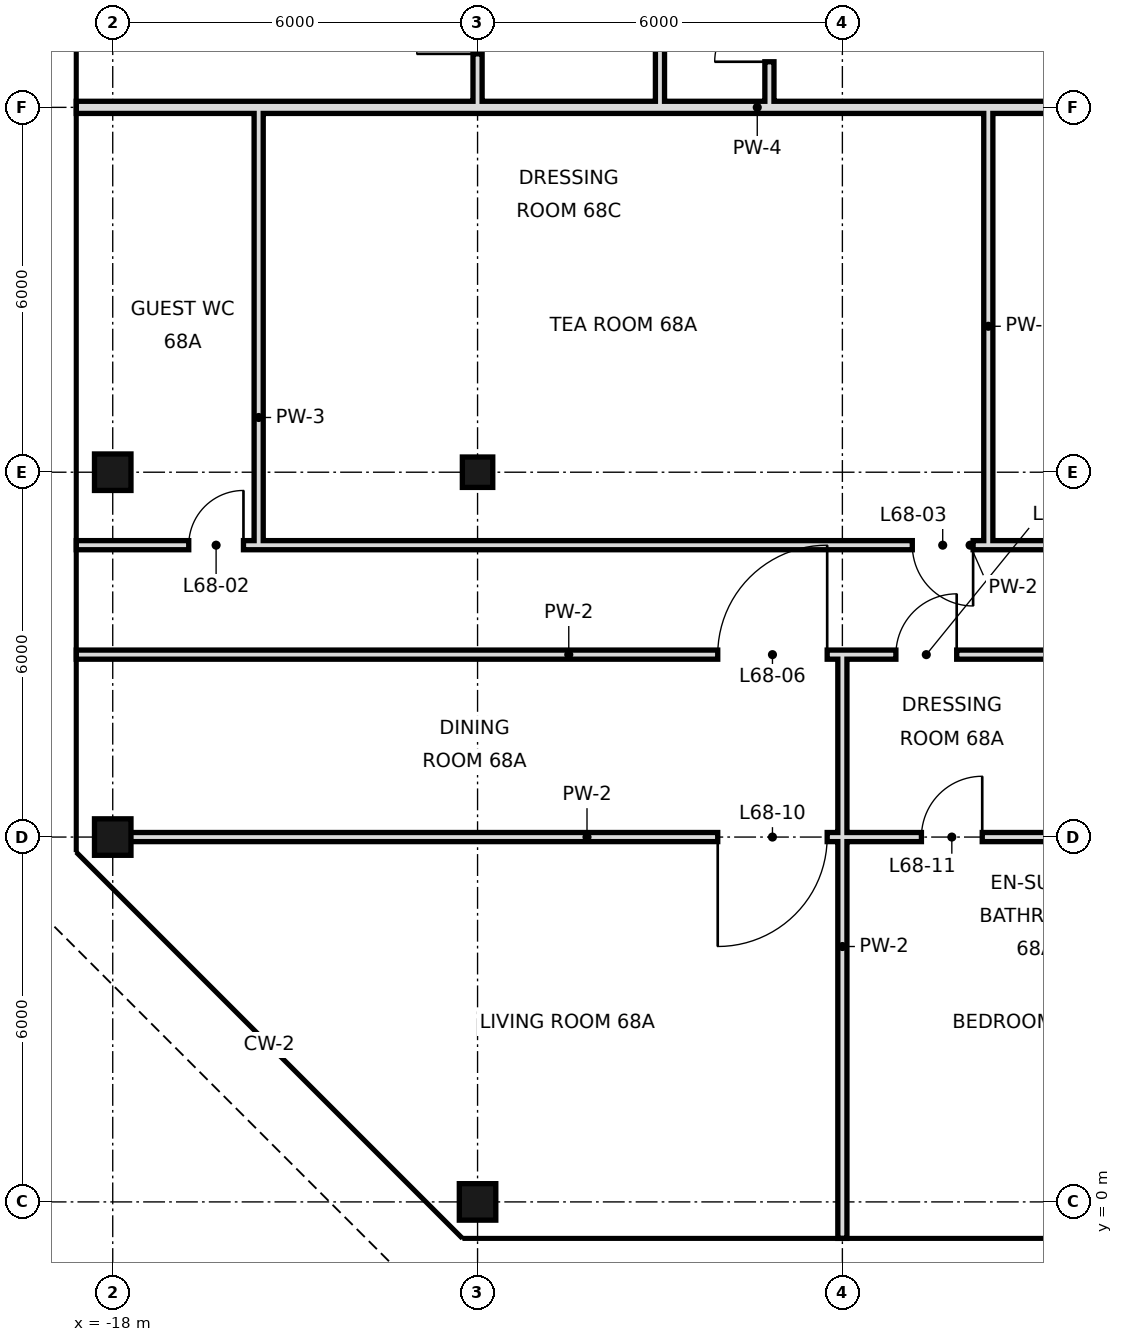
"""IFC4 building model, lengths in metres.
Left out: names, types, materials, properties, quantities, classifications, styles, units other than length and angle.
Written with IfcOpenShell. Run it as: python <this file> out.ifc"""

import sys

from ifc_helpers import new_model, si_unit, direction, frame, frame_2d, origin, origin_2d, place, context, subcontext, project, spatial, rectangle, hollow_rectangle, extrude, element, fill, save


model = new_model("IFC4")
c1 = context("Model", 3, precision=1e-05, world=origin(), true_north=direction((0.0, 1.0)))
c2 = subcontext(c1, "Body", "Model", "MODEL_VIEW")
j1 = project(units=[si_unit("LENGTHUNIT", "METRE"), si_unit("PLANEANGLEUNIT", "RADIAN")], contexts=[c1])
p1 = place(None, origin())
s1 = spatial("IfcSite", under=j1, at=p1, CompositionType="ELEMENT")
p2 = place(p1, origin())
s2 = spatial("IfcBuilding", under=s1, at=p2, CompositionType="ELEMENT")
p3 = place(p2, frame((0.0, 0.0, 290.8)))
s3 = spatial("IfcBuildingStorey", under=s2, at=p3, CompositionType="ELEMENT", Elevation=290.8)
for number, where, z_axis, x_axis in (
    (1, (-18.0, 6.0, -0.3), (0.0, 0.0, 1.0), (1.0, 0.0, 0.0)),
    (2, (-18.0, 12.0, -0.3), (0.0, 0.0, 1.0), (1.0, 0.0, 0.0)),
    (3, (-12.0, 0.0, -0.3), (0.0, 0.0, 1.0), (1.0, 0.0, 0.0)),
):
    element("IfcColumn", number, at=place(p3, frame(where, z_axis=z_axis, x_axis=x_axis)), inside=s3, PredefinedType="COLUMN", context=c2, shape_type="SweptSolid", body=[
        extrude(hollow_rectangle(XDim=0.6, YDim=0.6, WallThickness=0.028, at=origin_2d()), origin(), (0.0, 0.0, 1.0), 3.9),
    ])
p4 = place(p3, frame((-12.0, 12.0, 0.0), z_axis=(0.0, 0.0, 1.0), x_axis=(1.0, 0.0, 0.0)))
e4 = element("IfcColumn", 4, at=p4, inside=s3, PredefinedType="COLUMN", context=c2, shape_type="SweptSolid", body=[
    extrude(hollow_rectangle(XDim=0.5, YDim=0.5, WallThickness=0.025, at=origin_2d()), origin(), (0.0, 0.0, 1.0), 3.6),
])
p5 = place(p3, frame((-12.0, 18.0, 0.0), z_axis=(0.0, 0.0, 1.0), x_axis=(0.0, 1.0, 0.0)))
e5 = element("IfcWall", 5, at=p5, inside=s3, PredefinedType="PARTITIONING", context=c2, shape_type="SweptSolid", body=[
    extrude(rectangle(XDim=3.6, YDim=0.15, at=frame_2d((1.8, 0.0))), origin(), (0.0, 0.0, 1.0), 2.72),
])
p6 = place(p5, frame((0.88, 0.0, 0.0)))
e6 = element("IfcOpeningElement", 6, at=p6, cuts=e5, PredefinedType="OPENING", context=c2, shape_type="SweptSolid", body=[
    extrude(rectangle(XDim=1.0, YDim=2.4, at=frame_2d((0.5, 1.2))), frame((0.0, 0.085, 0.0), z_axis=(0.0, -1.0, 0.0), x_axis=(1.0, 0.0, 0.0)), (0.0, 0.0, 1.0), 0.17),
])
for number, where, z_axis, x_axis in (
    (7, (-15.6, 10.8, 0.0), (0.0, 0.0, 1.0), (0.0, 1.0, 0.0)),
    (8, (-3.6, 10.8, 0.0), (0.0, 0.0, 1.0), (0.0, 1.0, 0.0)),
):
    element("IfcWall", number, at=place(p3, frame(where, z_axis=z_axis, x_axis=x_axis)), inside=s3, PredefinedType="PARTITIONING", context=c2, shape_type="SweptSolid", body=[
        extrude(rectangle(XDim=7.2, YDim=0.15, at=frame_2d((3.6, 0.0))), origin(), (0.0, 0.0, 1.0), 3.42),
    ])
p7 = place(p3, frame((-6.0, -0.6, 0.0), z_axis=(0.0, 0.0, 1.0), x_axis=(0.0, 1.0, 0.0)))
e9 = element("IfcWall", 9, at=p7, inside=s3, PredefinedType="PARTITIONING", context=c2, shape_type="SweptSolid", body=[
    extrude(rectangle(XDim=9.6, YDim=0.15, at=frame_2d((4.8, 0.0))), origin(), (0.0, 0.0, 1.0), 3.42),
])
p8 = place(p3, frame((-7.2, 18.0, 0.0), z_axis=(0.0, 0.0, 1.0), x_axis=(0.0, 1.0, 0.0)))
e10 = element("IfcWall", 10, at=p8, inside=s3, PredefinedType="PARTITIONING", context=c2, shape_type="SweptSolid", body=[
    extrude(rectangle(XDim=2.4, YDim=0.15, at=frame_2d((1.2, 0.0))), origin(), (0.0, 0.0, 1.0), 3.42),
])
p9 = place(p8, frame((0.75, 0.0, 0.0)))
e11 = element("IfcOpeningElement", 11, at=p9, cuts=e10, PredefinedType="OPENING", context=c2, shape_type="SweptSolid", body=[
    extrude(rectangle(XDim=0.9, YDim=2.4, at=frame_2d((0.45, 1.2))), frame((0.0, 0.085, 0.0), z_axis=(0.0, -1.0, 0.0), x_axis=(1.0, 0.0, 0.0)), (0.0, 0.0, 1.0), 0.17),
])
p10 = place(p3, frame((-9.0, 18.0, 0.0), z_axis=(0.0, 0.0, 1.0), x_axis=(0.0, 1.0, 0.0)))
e12 = element("IfcWall", 12, at=p10, inside=s3, PredefinedType="PARTITIONING", context=c2, shape_type="SweptSolid", body=[
    extrude(rectangle(XDim=3.6, YDim=0.15, at=frame_2d((1.8, 0.0))), origin(), (0.0, 0.0, 1.0), 3.42),
])
p11 = place(p10, frame((1.3, 0.0, 0.0)))
e13 = element("IfcOpeningElement", 13, at=p11, cuts=e12, PredefinedType="OPENING", context=c2, shape_type="SweptSolid", body=[
    extrude(rectangle(XDim=1.0, YDim=2.4, at=frame_2d((0.5, 1.2))), frame((0.0, 0.085, 0.0), z_axis=(0.0, -1.0, 0.0), x_axis=(1.0, 0.0, 0.0)), (0.0, 0.0, 1.0), 0.17),
])
p12 = place(p3, frame((-15.6, 10.8, 0.0), z_axis=(0.0, 0.0, 1.0), x_axis=(1.0, 0.0, 0.0)))
e14 = element("IfcWall", 14, at=p12, inside=s3, PredefinedType="PARTITIONING", context=c2, shape_type="SweptSolid", body=[
    extrude(rectangle(XDim=23.4, YDim=0.15, at=frame_2d((11.7, 0.0))), origin(), (0.0, 0.0, 1.0), 3.42),
])
p13 = place(p12, frame((10.75, 0.0, 0.0)))
e15 = element("IfcOpeningElement", 15, at=p13, cuts=e14, PredefinedType="OPENING", context=c2, shape_type="SweptSolid", body=[
    extrude(rectangle(XDim=1.0, YDim=2.4, at=frame_2d((0.5, 1.2))), frame((0.0, 0.085, 0.0), z_axis=(0.0, -1.0, 0.0), x_axis=(1.0, 0.0, 0.0)), (0.0, 0.0, 1.0), 0.17),
])
p14 = place(p12, frame((17.2, 0.0, 0.0)))
e16 = element("IfcOpeningElement", 16, at=p14, cuts=e14, PredefinedType="OPENING", context=c2, shape_type="SweptSolid", body=[
    extrude(rectangle(XDim=1.0, YDim=2.4, at=frame_2d((0.5, 1.2))), frame((0.0, 0.085, 0.0), z_axis=(0.0, -1.0, 0.0), x_axis=(1.0, 0.0, 0.0)), (0.0, 0.0, 1.0), 0.17),
])
p15 = place(p3, frame((-18.6, 10.8, 0.0), z_axis=(0.0, 0.0, 1.0), x_axis=(1.0, 0.0, 0.0)))
e17 = element("IfcWall", 17, at=p15, inside=s3, PredefinedType="PARTITIONING", context=c2, shape_type="SweptSolid", body=[
    extrude(rectangle(XDim=3.0, YDim=0.15, at=frame_2d((1.5, 0.0))), origin(), (0.0, 0.0, 1.0), 3.42),
])
p16 = place(p15, frame((1.85, 0.0, 0.0)))
e18 = element("IfcOpeningElement", 18, at=p16, cuts=e17, PredefinedType="OPENING", context=c2, shape_type="SweptSolid", body=[
    extrude(rectangle(XDim=0.9, YDim=2.4, at=frame_2d((0.45, 1.2))), frame((0.0, 0.085, 0.0), z_axis=(0.0, -1.0, 0.0), x_axis=(1.0, 0.0, 0.0)), (0.0, 0.0, 1.0), 0.17),
])
p17 = place(p3, frame((-18.6, 18.0, 0.0), z_axis=(0.0, 0.0, 1.0), x_axis=(1.0, 0.0, 0.0)))
e19 = element("IfcWall", 19, at=p17, inside=s3, PredefinedType="SOLIDWALL", context=c2, shape_type="SweptSolid", body=[
    extrude(rectangle(XDim=21.7, YDim=0.2, at=frame_2d((10.85, 0.0))), origin(), (0.0, 0.0, 1.0), 2.72),
])
p18 = place(p3, frame((-18.0, 6.0, 0.0), z_axis=(0.0, 0.0, 1.0), x_axis=(1.0, 0.0, 0.0)))
e20 = element("IfcWall", 20, at=p18, inside=s3, PredefinedType="PARTITIONING", context=c2, shape_type="SweptSolid", body=[
    extrude(rectangle(XDim=15.6, YDim=0.15, at=frame_2d((7.8, 0.0))), origin(), (0.0, 0.0, 1.0), 2.72),
])
p19 = place(p18, frame((9.95, 0.0, 0.0)))
e21 = element("IfcOpeningElement", 21, at=p19, cuts=e20, PredefinedType="OPENING", context=c2, shape_type="SweptSolid", body=[
    extrude(rectangle(XDim=1.8, YDim=2.4, at=frame_2d((0.9, 1.2))), frame((0.0, 0.085, 0.0), z_axis=(0.0, -1.0, 0.0), x_axis=(1.0, 0.0, 0.0)), (0.0, 0.0, 1.0), 0.17),
])
p20 = place(p18, frame((13.3, 0.0, 0.0)))
e22 = element("IfcOpeningElement", 22, at=p20, cuts=e20, PredefinedType="OPENING", context=c2, shape_type="SweptSolid", body=[
    extrude(rectangle(XDim=1.0, YDim=2.4, at=frame_2d((0.5, 1.2))), frame((0.0, 0.085, 0.0), z_axis=(0.0, -1.0, 0.0), x_axis=(1.0, 0.0, 0.0)), (0.0, 0.0, 1.0), 0.17),
])
p21 = place(p3, frame((-18.6, 9.0, 0.0), z_axis=(0.0, 0.0, 1.0), x_axis=(1.0, 0.0, 0.0)))
e23 = element("IfcWall", 23, at=p21, inside=s3, PredefinedType="PARTITIONING", context=c2, shape_type="SweptSolid", body=[
    extrude(rectangle(XDim=16.2, YDim=0.15, at=frame_2d((8.1, 0.0))), origin(), (0.0, 0.0, 1.0), 3.42),
])
p22 = place(p21, frame((10.55, 0.0, 0.0)))
e24 = element("IfcOpeningElement", 24, at=p22, cuts=e23, PredefinedType="OPENING", context=c2, shape_type="SweptSolid", body=[
    extrude(rectangle(XDim=1.8, YDim=2.4, at=frame_2d((0.9, 1.2))), frame((0.0, 0.085, 0.0), z_axis=(0.0, -1.0, 0.0), x_axis=(1.0, 0.0, 0.0)), (0.0, 0.0, 1.0), 0.17),
])
p23 = place(p21, frame((13.48, 0.0, 0.0)))
e25 = element("IfcOpeningElement", 25, at=p23, cuts=e23, PredefinedType="OPENING", context=c2, shape_type="SweptSolid", body=[
    extrude(rectangle(XDim=1.0, YDim=2.4, at=frame_2d((0.5, 1.2))), frame((0.0, 0.085, 0.0), z_axis=(0.0, -1.0, 0.0), x_axis=(1.0, 0.0, 0.0)), (0.0, 0.0, 1.0), 0.17),
])
p24 = place(p16, frame((0.9, 0.0, 0.0), z_axis=(0.0, 0.0, 1.0), x_axis=(-1.0, 0.0, 0.0)))
e26 = element("IfcDoor", 26, at=p24, inside=s3, OperationType="SINGLE_SWING_LEFT", PredefinedType="DOOR", context=c2, shape_type="SweptSolid", body=[
    extrude(rectangle(XDim=0.9, YDim=2.4, at=frame_2d((0.45, 1.2))), frame((0.0, 0.025, 0.0), z_axis=(0.0, -1.0, 0.0), x_axis=(1.0, 0.0, 0.0)), (0.0, 0.0, 1.0), 0.05),
])
fill(e18, e26)
p25 = place(p13, origin())
e27 = element("IfcDoor", 27, at=p25, inside=s3, OperationType="SINGLE_SWING_RIGHT", PredefinedType="DOOR", context=c2, shape_type="SweptSolid", body=[
    extrude(rectangle(XDim=1.0, YDim=2.4, at=frame_2d((0.5, 1.2))), frame((0.0, 0.025, 0.0), z_axis=(0.0, -1.0, 0.0), x_axis=(1.0, 0.0, 0.0)), (0.0, 0.0, 1.0), 0.05),
])
fill(e15, e27)
p26 = place(p22, frame((1.8, 0.0, 0.0), z_axis=(0.0, 0.0, 1.0), x_axis=(-1.0, 0.0, 0.0)))
e28 = element("IfcDoor", 28, at=p26, inside=s3, OperationType="SINGLE_SWING_LEFT", PredefinedType="DOOR", context=c2, shape_type="SweptSolid", body=[
    extrude(rectangle(XDim=1.8, YDim=2.4, at=frame_2d((0.9, 1.2))), frame((0.0, 0.025, 0.0), z_axis=(0.0, -1.0, 0.0), x_axis=(1.0, 0.0, 0.0)), (0.0, 0.0, 1.0), 0.05),
])
fill(e24, e28)
p27 = place(p23, frame((1.0, 0.0, 0.0), z_axis=(0.0, 0.0, 1.0), x_axis=(-1.0, 0.0, 0.0)))
e29 = element("IfcDoor", 29, at=p27, inside=s3, OperationType="SINGLE_SWING_LEFT", PredefinedType="DOOR", context=c2, shape_type="SweptSolid", body=[
    extrude(rectangle(XDim=1.0, YDim=2.4, at=frame_2d((0.5, 1.2))), frame((0.0, 0.025, 0.0), z_axis=(0.0, -1.0, 0.0), x_axis=(1.0, 0.0, 0.0)), (0.0, 0.0, 1.0), 0.05),
])
fill(e25, e29)
p28 = place(p19, frame((1.8, 0.0, 0.0), z_axis=(0.0, 0.0, 1.0), x_axis=(-1.0, 0.0, 0.0)))
e30 = element("IfcDoor", 30, at=p28, inside=s3, OperationType="SINGLE_SWING_RIGHT", PredefinedType="DOOR", context=c2, shape_type="SweptSolid", body=[
    extrude(rectangle(XDim=1.8, YDim=2.4, at=frame_2d((0.9, 1.2))), frame((0.0, 0.025, 0.0), z_axis=(0.0, -1.0, 0.0), x_axis=(1.0, 0.0, 0.0)), (0.0, 0.0, 1.0), 0.05),
])
fill(e21, e30)
p29 = place(p20, frame((1.0, 0.0, 0.0), z_axis=(0.0, 0.0, 1.0), x_axis=(-1.0, 0.0, 0.0)))
e31 = element("IfcDoor", 31, at=p29, inside=s3, OperationType="SINGLE_SWING_LEFT", PredefinedType="DOOR", context=c2, shape_type="SweptSolid", body=[
    extrude(rectangle(XDim=1.0, YDim=2.4, at=frame_2d((0.5, 1.2))), frame((0.0, 0.025, 0.0), z_axis=(0.0, -1.0, 0.0), x_axis=(1.0, 0.0, 0.0)), (0.0, 0.0, 1.0), 0.05),
])
fill(e22, e31)
p30 = place(p9, origin())
e32 = element("IfcDoor", 32, at=p30, inside=s3, OperationType="SINGLE_SWING_LEFT", PredefinedType="DOOR", context=c2, shape_type="SweptSolid", body=[
    extrude(rectangle(XDim=0.9, YDim=2.4, at=frame_2d((0.45, 1.2))), frame((0.0, 0.025, 0.0), z_axis=(0.0, -1.0, 0.0), x_axis=(1.0, 0.0, 0.0)), (0.0, 0.0, 1.0), 0.05),
])
fill(e11, e32)
p31 = place(p6, origin())
e33 = element("IfcDoor", 33, at=p31, inside=s3, OperationType="SINGLE_SWING_LEFT", PredefinedType="DOOR", context=c2, shape_type="SweptSolid", body=[
    extrude(rectangle(XDim=1.0, YDim=2.4, at=frame_2d((0.5, 1.2))), frame((0.0, 0.025, 0.0), z_axis=(0.0, -1.0, 0.0), x_axis=(1.0, 0.0, 0.0)), (0.0, 0.0, 1.0), 0.05),
])
fill(e6, e33)
save(model, sys.argv[1])
